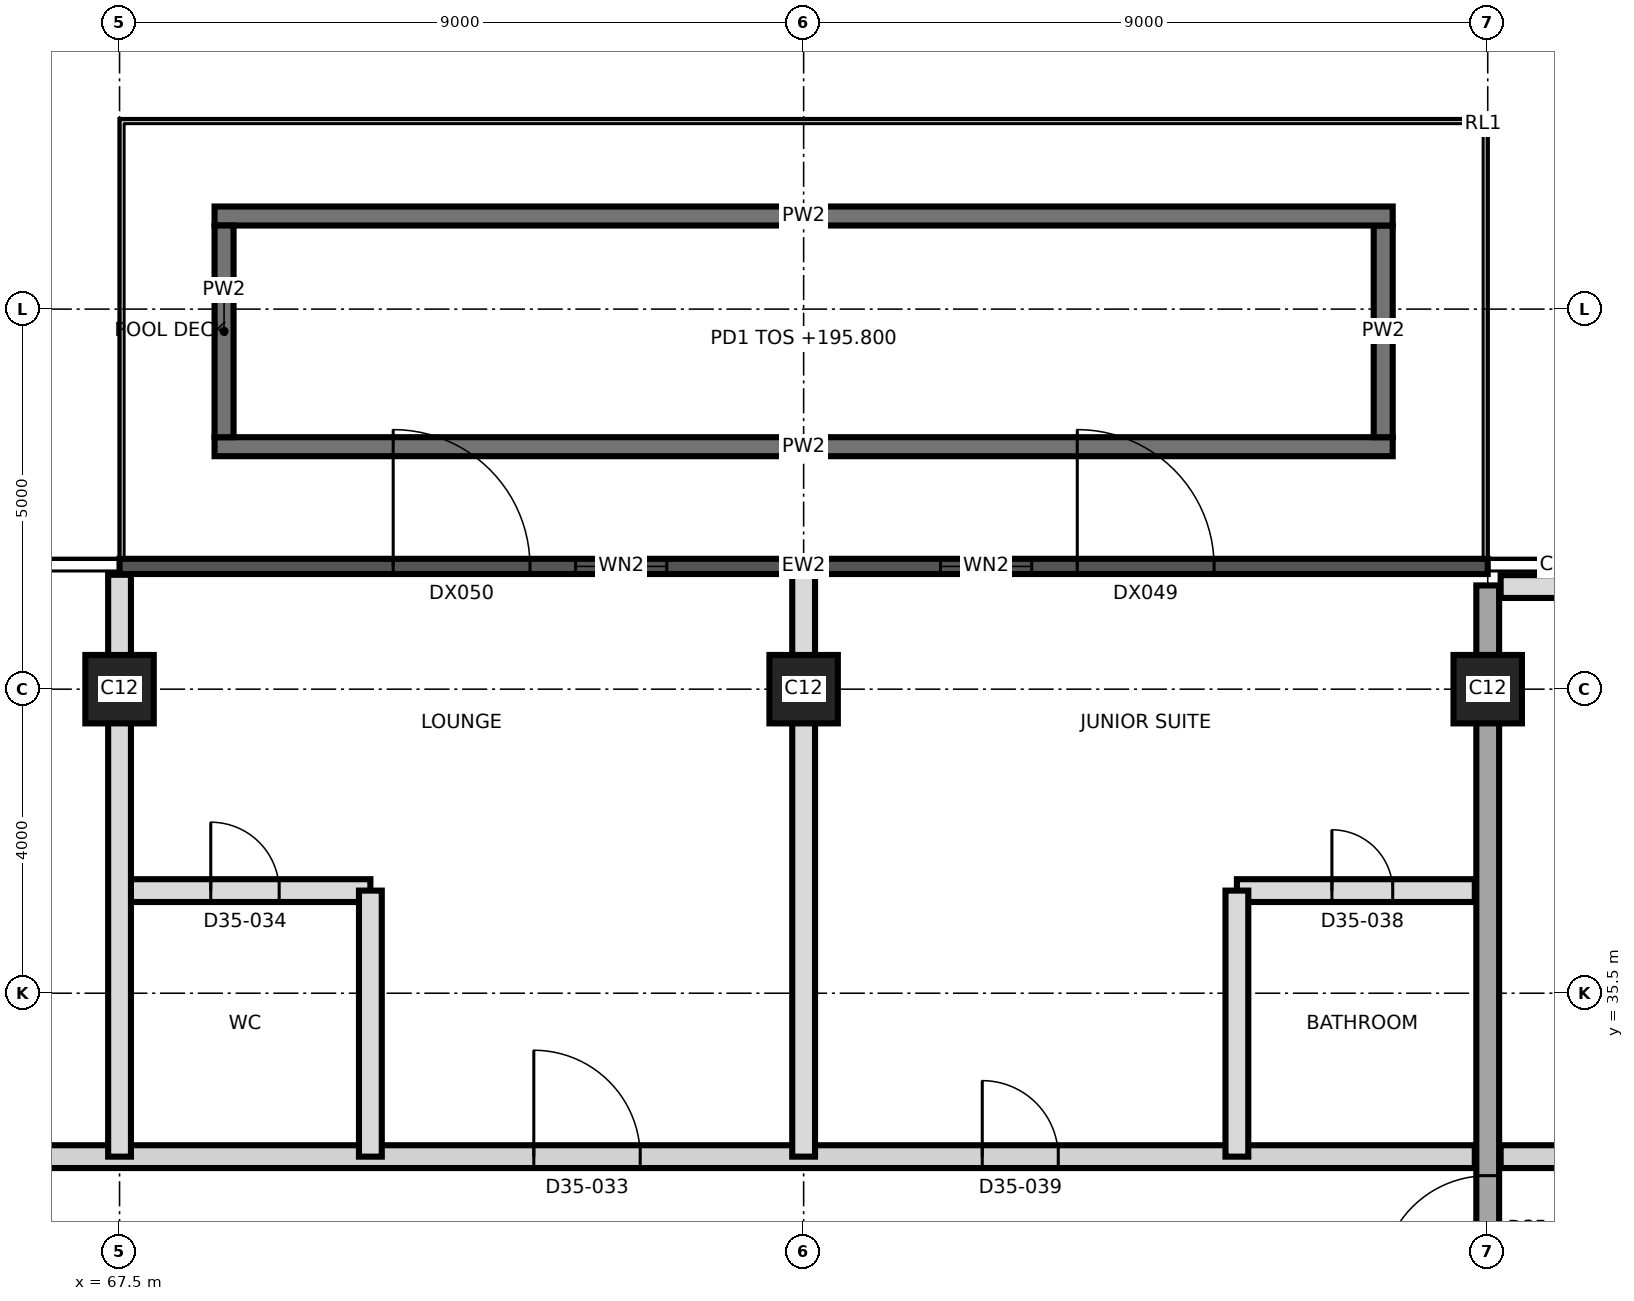
"""IFC4 building model, lengths in metres.
Left out: names, types, materials, properties, quantities, classifications, styles, units other than length and angle.
Written with IfcOpenShell. Run it as: python <this file> out.ifc"""

import sys

from ifc_helpers import new_model, si_unit, direction, frame, frame_2d, origin, origin_2d, place, context, subcontext, project, spatial, rectangle, extrude, element, fill, save


model = new_model("IFC4")
c1 = context("Model", 3, precision=1e-05, world=origin(), true_north=direction((0.0, 1.0)))
c2 = subcontext(c1, "Body", "Model", "MODEL_VIEW")
j1 = project(units=[si_unit("LENGTHUNIT", "METRE"), si_unit("PLANEANGLEUNIT", "RADIAN")], contexts=[c1])
p1 = place(None, origin())
s1 = spatial("IfcSite", under=j1, at=p1, CompositionType="ELEMENT")
p2 = place(p1, origin())
s2 = spatial("IfcBuilding", under=s1, at=p2, CompositionType="ELEMENT")
p3 = place(p2, frame((0.0, 0.0, 195.8)))
s3 = spatial("IfcBuildingStorey", under=s2, at=p3, CompositionType="ELEMENT", Elevation=195.8)
for number, where, z_axis, x_axis in (
    (1, (67.5, 39.5, 0.0), (0.0, 0.0, 1.0), (1.0, 0.0, 0.0)),
    (2, (76.5, 39.5, 0.0), (0.0, 0.0, 1.0), (1.0, 0.0, 0.0)),
    (3, (85.5, 39.5, 0.0), (0.0, 0.0, 1.0), (1.0, 0.0, 0.0)),
):
    element("IfcColumn", number, at=place(p3, frame(where, z_axis=z_axis, x_axis=x_axis)), inside=s3, PredefinedType="COLUMN", context=c2, shape_type="SweptSolid", body=[
        extrude(rectangle(XDim=0.9, YDim=0.9, at=origin_2d()), origin(), (0.0, 0.0, 1.0), 3.7),
    ])
p4 = place(p3, frame((85.5, 20.135, 0.0), z_axis=(0.0, 0.0, 1.0), x_axis=(0.0, 1.0, 0.0)))
e4 = element("IfcWall", 4, at=p4, inside=s3, PredefinedType="SHEAR", context=c2, shape_type="SweptSolid", body=[
    extrude(rectangle(XDim=20.73, YDim=0.3, at=frame_2d((10.365, 0.0))), origin(), (0.0, 0.0, 1.0), 3.7),
])
p5 = place(p4, frame((11.565, 0.0, 0.0)))
e5 = element("IfcOpeningElement", 5, at=p5, cuts=e4, PredefinedType="OPENING", context=c2, shape_type="SweptSolid", body=[
    extrude(rectangle(XDim=1.4, YDim=2.1, at=frame_2d((0.7, 1.05))), frame((0.0, 0.16, 0.0), z_axis=(0.0, -1.0, 0.0), x_axis=(1.0, 0.0, 0.0)), (0.0, 0.0, 1.0), 0.32),
])
p6 = place(p3, frame((68.75, 42.69, 0.0), z_axis=(0.0, 0.0, 1.0), x_axis=(1.0, 0.0, 0.0)))
e6 = element("IfcWall", 6, at=p6, inside=s3, PredefinedType="SOLIDWALL", context=c2, shape_type="SweptSolid", body=[
    extrude(rectangle(XDim=15.5, YDim=0.25, at=frame_2d((7.75, 0.0))), origin(), (0.0, 0.0, 1.0), 1.65),
])
p7 = place(p3, frame((84.125, 42.815, 0.0), z_axis=(0.0, 0.0, 1.0), x_axis=(0.0, 1.0, 0.0)))
e7 = element("IfcWall", 7, at=p7, inside=s3, PredefinedType="SOLIDWALL", context=c2, shape_type="SweptSolid", body=[
    extrude(rectangle(XDim=2.785, YDim=0.25, at=frame_2d((1.393, 0.0))), origin(), (0.0, 0.0, 1.0), 1.65),
])
p8 = place(p3, frame((84.25, 45.725, 0.0), z_axis=(0.0, 0.0, 1.0), x_axis=(-1.0, 0.0, 0.0)))
e8 = element("IfcWall", 8, at=p8, inside=s3, PredefinedType="SOLIDWALL", context=c2, shape_type="SweptSolid", body=[
    extrude(rectangle(XDim=15.5, YDim=0.25, at=frame_2d((7.75, 0.0))), origin(), (0.0, 0.0, 1.0), 1.65),
])
p9 = place(p3, frame((68.875, 45.6, 0.0), z_axis=(0.0, 0.0, 1.0), x_axis=(0.0, -1.0, 0.0)))
e9 = element("IfcWall", 9, at=p9, inside=s3, PredefinedType="SOLIDWALL", context=c2, shape_type="SweptSolid", body=[
    extrude(rectangle(XDim=2.785, YDim=0.25, at=frame_2d((1.393, 0.0))), origin(), (0.0, 0.0, 1.0), 1.65),
])
p10 = place(p3, frame((67.5, 41.115, 0.0), z_axis=(0.0, 0.0, 1.0), x_axis=(1.0, 0.0, 0.0)))
e10 = element("IfcWall", 10, at=p10, inside=s3, PredefinedType="SOLIDWALL", context=c2, shape_type="SweptSolid", body=[
    extrude(rectangle(XDim=18.0, YDim=0.2, at=frame_2d((9.0, 0.0))), origin(), (0.0, 0.0, 1.0), 3.4),
])
p11 = place(p10, frame((12.6, 0.0, 0.0)))
e11 = element("IfcOpeningElement", 11, at=p11, cuts=e10, PredefinedType="OPENING", context=c2, shape_type="SweptSolid", body=[
    extrude(rectangle(XDim=1.8, YDim=2.4, at=frame_2d((0.9, 1.2))), frame((0.0, 0.11, 0.0), z_axis=(0.0, -1.0, 0.0), x_axis=(1.0, 0.0, 0.0)), (0.0, 0.0, 1.0), 0.22),
])
p12 = place(p10, frame((10.8, 0.0, 0.9)))
e12 = element("IfcOpeningElement", 12, at=p12, cuts=e10, PredefinedType="OPENING", context=c2, shape_type="SweptSolid", body=[
    extrude(rectangle(XDim=1.2, YDim=2.1, at=frame_2d((0.6, 1.05))), frame((0.0, 0.11, 0.0), z_axis=(0.0, -1.0, 0.0), x_axis=(1.0, 0.0, 0.0)), (0.0, 0.0, 1.0), 0.22),
])
p13 = place(p10, frame((6.0, 0.0, 0.9)))
e13 = element("IfcOpeningElement", 13, at=p13, cuts=e10, PredefinedType="OPENING", context=c2, shape_type="SweptSolid", body=[
    extrude(rectangle(XDim=1.2, YDim=2.1, at=frame_2d((0.6, 1.05))), frame((0.0, 0.11, 0.0), z_axis=(0.0, -1.0, 0.0), x_axis=(1.0, 0.0, 0.0)), (0.0, 0.0, 1.0), 0.22),
])
p14 = place(p10, frame((3.6, 0.0, 0.0)))
e14 = element("IfcOpeningElement", 14, at=p14, cuts=e10, PredefinedType="OPENING", context=c2, shape_type="SweptSolid", body=[
    extrude(rectangle(XDim=1.8, YDim=2.4, at=frame_2d((0.9, 1.2))), frame((0.0, 0.11, 0.0), z_axis=(0.0, -1.0, 0.0), x_axis=(1.0, 0.0, 0.0)), (0.0, 0.0, 1.0), 0.22),
])
p15 = place(p3, frame((58.55, 33.35, 0.0), z_axis=(0.0, 0.0, 1.0), x_axis=(1.0, 0.0, 0.0)))
e15 = element("IfcWall", 15, at=p15, inside=s3, PredefinedType="PARTITIONING", context=c2, shape_type="SweptSolid", body=[
    extrude(rectangle(XDim=26.78, YDim=0.3, at=frame_2d((13.39, 0.0))), origin(), (0.0, 0.0, 1.0), 3.4),
])
p16 = place(p15, frame((1.1, 0.0, 0.0)))
e16 = element("IfcOpeningElement", 16, at=p16, cuts=e15, PredefinedType="OPENING", context=c2, shape_type="SweptSolid", body=[
    extrude(rectangle(XDim=1.0, YDim=2.1, at=frame_2d((0.5, 1.05))), frame((0.0, 0.16, 0.0), z_axis=(0.0, -1.0, 0.0), x_axis=(1.0, 0.0, 0.0)), (0.0, 0.0, 1.0), 0.32),
])
p17 = place(p15, frame((6.95, 0.0, 0.0)))
e17 = element("IfcOpeningElement", 17, at=p17, cuts=e15, PredefinedType="OPENING", context=c2, shape_type="SweptSolid", body=[
    extrude(rectangle(XDim=1.0, YDim=2.1, at=frame_2d((0.5, 1.05))), frame((0.0, 0.16, 0.0), z_axis=(0.0, -1.0, 0.0), x_axis=(1.0, 0.0, 0.0)), (0.0, 0.0, 1.0), 0.32),
])
p18 = place(p15, frame((14.4, 0.0, 0.0)))
e18 = element("IfcOpeningElement", 18, at=p18, cuts=e15, PredefinedType="OPENING", context=c2, shape_type="SweptSolid", body=[
    extrude(rectangle(XDim=1.4, YDim=2.4, at=frame_2d((0.7, 1.2))), frame((0.0, 0.16, 0.0), z_axis=(0.0, -1.0, 0.0), x_axis=(1.0, 0.0, 0.0)), (0.0, 0.0, 1.0), 0.32),
])
p19 = place(p15, frame((20.3, 0.0, 0.0)))
e19 = element("IfcOpeningElement", 19, at=p19, cuts=e15, PredefinedType="OPENING", context=c2, shape_type="SweptSolid", body=[
    extrude(rectangle(XDim=1.0, YDim=2.4, at=frame_2d((0.5, 1.2))), frame((0.0, 0.16, 0.0), z_axis=(0.0, -1.0, 0.0), x_axis=(1.0, 0.0, 0.0)), (0.0, 0.0, 1.0), 0.32),
])
p20 = place(p3, frame((85.67, 33.35, 0.0), z_axis=(0.0, 0.0, 1.0), x_axis=(1.0, 0.0, 0.0)))
e20 = element("IfcWall", 20, at=p20, inside=s3, PredefinedType="PARTITIONING", context=c2, shape_type="SweptSolid", body=[
    extrude(rectangle(XDim=9.58, YDim=0.3, at=frame_2d((4.79, 0.0))), origin(), (0.0, 0.0, 1.0), 3.4),
])
p21 = place(p20, frame((1.83, 0.0, 0.0)))
e21 = element("IfcOpeningElement", 21, at=p21, cuts=e20, PredefinedType="OPENING", context=c2, shape_type="SweptSolid", body=[
    extrude(rectangle(XDim=1.0, YDim=2.1, at=frame_2d((0.5, 1.05))), frame((0.0, 0.16, 0.0), z_axis=(0.0, -1.0, 0.0), x_axis=(1.0, 0.0, 0.0)), (0.0, 0.0, 1.0), 0.32),
])
p22 = place(p20, frame((5.63, 0.0, 0.0)))
e22 = element("IfcOpeningElement", 22, at=p22, cuts=e20, PredefinedType="OPENING", context=c2, shape_type="SweptSolid", body=[
    extrude(rectangle(XDim=1.0, YDim=2.1, at=frame_2d((0.5, 1.05))), frame((0.0, 0.16, 0.0), z_axis=(0.0, -1.0, 0.0), x_axis=(1.0, 0.0, 0.0)), (0.0, 0.0, 1.0), 0.32),
])
p23 = place(p3, frame((67.5, 36.85, 0.0), z_axis=(0.0, 0.0, 1.0), x_axis=(1.0, 0.0, 0.0)))
e23 = element("IfcWall", 23, at=p23, inside=s3, PredefinedType="PARTITIONING", context=c2, shape_type="SweptSolid", body=[
    extrude(rectangle(XDim=3.3, YDim=0.3, at=frame_2d((1.65, 0.0))), origin(), (0.0, 0.0, 1.0), 3.4),
])
p24 = place(p23, frame((1.2, 0.0, 0.0)))
e24 = element("IfcOpeningElement", 24, at=p24, cuts=e23, PredefinedType="OPENING", context=c2, shape_type="SweptSolid", body=[
    extrude(rectangle(XDim=0.9, YDim=2.1, at=frame_2d((0.45, 1.05))), frame((0.0, 0.16, 0.0), z_axis=(0.0, -1.0, 0.0), x_axis=(1.0, 0.0, 0.0)), (0.0, 0.0, 1.0), 0.32),
])
p25 = place(p3, frame((82.2, 36.85, 0.0), z_axis=(0.0, 0.0, 1.0), x_axis=(1.0, 0.0, 0.0)))
e25 = element("IfcWall", 25, at=p25, inside=s3, PredefinedType="PARTITIONING", context=c2, shape_type="SweptSolid", body=[
    extrude(rectangle(XDim=3.13, YDim=0.3, at=frame_2d((1.565, 0.0))), origin(), (0.0, 0.0, 1.0), 3.4),
])
p26 = place(p25, frame((1.25, 0.0, 0.0)))
e26 = element("IfcOpeningElement", 26, at=p26, cuts=e25, PredefinedType="OPENING", context=c2, shape_type="SweptSolid", body=[
    extrude(rectangle(XDim=0.8, YDim=2.1, at=frame_2d((0.4, 1.05))), frame((0.0, 0.16, 0.0), z_axis=(0.0, -1.0, 0.0), x_axis=(1.0, 0.0, 0.0)), (0.0, 0.0, 1.0), 0.32),
])
p27 = place(p3, frame((85.67, 40.85, 0.0), z_axis=(0.0, 0.0, 1.0), x_axis=(1.0, 0.0, 0.0)))
e27 = element("IfcWall", 27, at=p27, inside=s3, PredefinedType="PARTITIONING", context=c2, shape_type="SweptSolid", body=[
    extrude(rectangle(XDim=1.943, YDim=0.3, at=frame_2d((0.972, 0.0))), origin(), (0.0, 0.0, 1.0), 3.4),
])
p28 = place(p3, frame((67.5, 33.35, 0.0), z_axis=(0.0, 0.0, 1.0), x_axis=(0.0, 1.0, 0.0)))
e28 = element("IfcWall", 28, at=p28, inside=s3, PredefinedType="PARTITIONING", context=c2, shape_type="SweptSolid", body=[
    extrude(rectangle(XDim=7.655, YDim=0.3, at=frame_2d((3.827, 0.0))), origin(), (0.0, 0.0, 1.0), 3.4),
])
p29 = place(p3, frame((70.8, 33.35, 0.0), z_axis=(0.0, 0.0, 1.0), x_axis=(0.0, 1.0, 0.0)))
e29 = element("IfcWall", 29, at=p29, inside=s3, PredefinedType="PARTITIONING", context=c2, shape_type="SweptSolid", body=[
    extrude(rectangle(XDim=3.5, YDim=0.3, at=frame_2d((1.75, 0.0))), origin(), (0.0, 0.0, 1.0), 3.4),
])
p30 = place(p3, frame((76.5, 33.35, 0.0), z_axis=(0.0, 0.0, 1.0), x_axis=(0.0, 1.0, 0.0)))
e30 = element("IfcWall", 30, at=p30, inside=s3, PredefinedType="PARTITIONING", context=c2, shape_type="SweptSolid", body=[
    extrude(rectangle(XDim=7.655, YDim=0.3, at=frame_2d((3.827, 0.0))), origin(), (0.0, 0.0, 1.0), 3.4),
])
p31 = place(p3, frame((82.2, 33.35, 0.0), z_axis=(0.0, 0.0, 1.0), x_axis=(0.0, 1.0, 0.0)))
e31 = element("IfcWall", 31, at=p31, inside=s3, PredefinedType="PARTITIONING", context=c2, shape_type="SweptSolid", body=[
    extrude(rectangle(XDim=3.5, YDim=0.3, at=frame_2d((1.75, 0.0))), origin(), (0.0, 0.0, 1.0), 3.4),
])
p32 = place(p11, origin())
e32 = element("IfcDoor", 32, at=p32, inside=s3, OperationType="SINGLE_SWING_LEFT", PredefinedType="DOOR", context=c2, shape_type="SweptSolid", body=[
    extrude(rectangle(XDim=1.8, YDim=2.4, at=frame_2d((0.9, 1.2))), frame((0.0, 0.025, 0.0), z_axis=(0.0, -1.0, 0.0), x_axis=(1.0, 0.0, 0.0)), (0.0, 0.0, 1.0), 0.05),
])
fill(e11, e32)
p33 = place(p12, origin())
e33 = element("IfcWindow", 33, at=p33, inside=s3, PartitioningType="SINGLE_PANEL", PredefinedType="WINDOW", context=c2, shape_type="SweptSolid", body=[
    extrude(rectangle(XDim=1.2, YDim=2.1, at=frame_2d((0.6, 1.05))), frame((0.0, 0.03, 0.0), z_axis=(0.0, -1.0, 0.0), x_axis=(1.0, 0.0, 0.0)), (0.0, 0.0, 1.0), 0.06),
])
fill(e12, e33)
p34 = place(p13, origin())
e34 = element("IfcWindow", 34, at=p34, inside=s3, PartitioningType="SINGLE_PANEL", PredefinedType="WINDOW", context=c2, shape_type="SweptSolid", body=[
    extrude(rectangle(XDim=1.2, YDim=2.1, at=frame_2d((0.6, 1.05))), frame((0.0, 0.03, 0.0), z_axis=(0.0, -1.0, 0.0), x_axis=(1.0, 0.0, 0.0)), (0.0, 0.0, 1.0), 0.06),
])
fill(e13, e34)
p35 = place(p14, origin())
e35 = element("IfcDoor", 35, at=p35, inside=s3, OperationType="SINGLE_SWING_LEFT", PredefinedType="DOOR", context=c2, shape_type="SweptSolid", body=[
    extrude(rectangle(XDim=1.8, YDim=2.4, at=frame_2d((0.9, 1.2))), frame((0.0, 0.025, 0.0), z_axis=(0.0, -1.0, 0.0), x_axis=(1.0, 0.0, 0.0)), (0.0, 0.0, 1.0), 0.05),
])
fill(e14, e35)
p36 = place(p18, origin())
e36 = element("IfcDoor", 36, at=p36, inside=s3, OperationType="SINGLE_SWING_LEFT", PredefinedType="DOOR", context=c2, shape_type="SweptSolid", body=[
    extrude(rectangle(XDim=1.4, YDim=2.4, at=frame_2d((0.7, 1.2))), frame((0.0, 0.025, 0.0), z_axis=(0.0, -1.0, 0.0), x_axis=(1.0, 0.0, 0.0)), (0.0, 0.0, 1.0), 0.05),
])
fill(e18, e36)
p37 = place(p24, origin())
e37 = element("IfcDoor", 37, at=p37, inside=s3, OperationType="SINGLE_SWING_LEFT", PredefinedType="DOOR", context=c2, shape_type="SweptSolid", body=[
    extrude(rectangle(XDim=0.9, YDim=2.1, at=frame_2d((0.45, 1.05))), frame((0.0, 0.025, 0.0), z_axis=(0.0, -1.0, 0.0), x_axis=(1.0, 0.0, 0.0)), (0.0, 0.0, 1.0), 0.05),
])
fill(e24, e37)
p38 = place(p26, origin())
e38 = element("IfcDoor", 38, at=p38, inside=s3, OperationType="SINGLE_SWING_LEFT", PredefinedType="DOOR", context=c2, shape_type="SweptSolid", body=[
    extrude(rectangle(XDim=0.8, YDim=2.1, at=frame_2d((0.4, 1.05))), frame((0.0, 0.025, 0.0), z_axis=(0.0, -1.0, 0.0), x_axis=(1.0, 0.0, 0.0)), (0.0, 0.0, 1.0), 0.05),
])
fill(e26, e38)
p39 = place(p19, origin())
e39 = element("IfcDoor", 39, at=p39, inside=s3, OperationType="SINGLE_SWING_RIGHT", PredefinedType="DOOR", context=c2, shape_type="SweptSolid", body=[
    extrude(rectangle(XDim=1.0, YDim=2.4, at=frame_2d((0.5, 1.2))), frame((0.0, 0.025, 0.0), z_axis=(0.0, -1.0, 0.0), x_axis=(1.0, 0.0, 0.0)), (0.0, 0.0, 1.0), 0.05),
])
fill(e19, e39)
p40 = place(p5, origin())
e40 = element("IfcDoor", 40, at=p40, inside=s3, OperationType="SINGLE_SWING_RIGHT", PredefinedType="DOOR", context=c2, shape_type="SweptSolid", body=[
    extrude(rectangle(XDim=1.4, YDim=2.1, at=frame_2d((0.7, 1.05))), frame((0.0, 0.025, 0.0), z_axis=(0.0, -1.0, 0.0), x_axis=(1.0, 0.0, 0.0)), (0.0, 0.0, 1.0), 0.05),
])
fill(e5, e40)
save(model, sys.argv[1])
